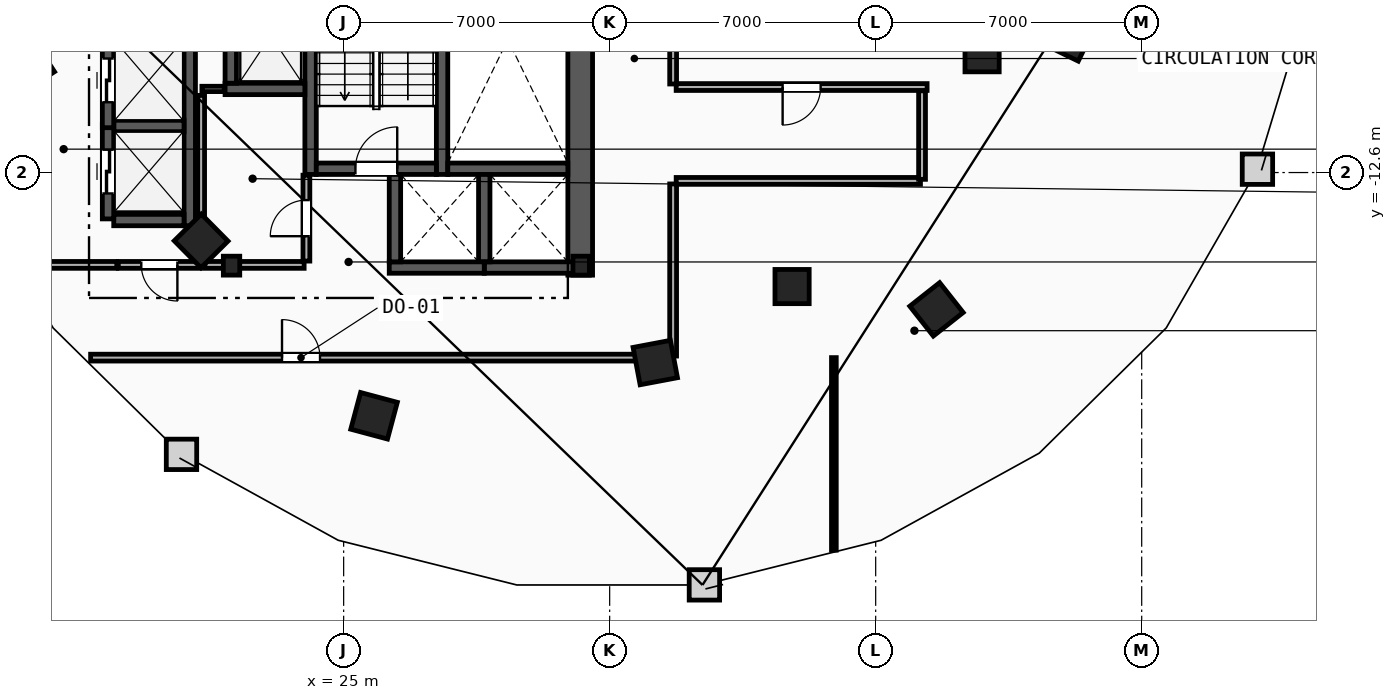
"""IFC4 building model, lengths in metres.
Left out: names, types, materials, properties, quantities, classifications, styles, units other than length and angle.
Written with IfcOpenShell. Run it as: python <this file> out.ifc"""

import sys

from ifc_helpers import new_model, si_unit, direction, frame, frame_2d, origin, origin_2d, place, context, subcontext, project, spatial, rectangle, i_section, extrude, element, fill, save


model = new_model("IFC4")
c1 = context("Model", 3, precision=1e-05, world=origin(), true_north=direction((0.0, 1.0)))
c2 = subcontext(c1, "Body", "Model", "MODEL_VIEW")
j1 = project(units=[si_unit("LENGTHUNIT", "METRE"), si_unit("PLANEANGLEUNIT", "RADIAN")], contexts=[c1])
p1 = place(None, origin())
s1 = spatial("IfcSite", under=j1, at=p1, CompositionType="ELEMENT")
p2 = place(p1, origin())
s2 = spatial("IfcBuilding", under=s1, at=p2, CompositionType="ELEMENT")
p3 = place(p2, frame((0.0, 0.0, 144.0)))
s3 = spatial("IfcBuildingStorey", under=s2, at=p3, CompositionType="ELEMENT", Elevation=144.0)
for number, where, z_axis, x_axis in (
    (1, (22.05, -15.05, 0.0), (0.0, 0.0, 1.0), (1.0, 0.0, 0.0)),
    (2, (31.25, -15.05, 0.0), (0.0, 0.0, 1.0), (1.0, 0.0, 0.0)),
):
    element("IfcColumn", number, at=place(p3, frame(where, z_axis=z_axis, x_axis=x_axis)), inside=s3, PredefinedType="COLUMN", context=c2, shape_type="SweptSolid", body=[
        extrude(i_section(OverallWidth=0.432, OverallDepth=0.498, WebThickness=0.056, FlangeThickness=0.089, FilletRadius=0.018, at=origin_2d()), origin(), (0.0, 0.0, 1.0), 3.6),
    ])
for number, where, z_axis, x_axis in (
    (3, (41.8, -9.5, 0.0), (0.0, 0.0, 1.0), (1.0, 0.0, 0.0)),
    (4, (36.8, -15.6, 0.0), (0.0, 0.0, 1.0), (1.0, 0.0, 0.0)),
):
    element("IfcColumn", number, at=place(p3, frame(where, z_axis=z_axis, x_axis=x_axis)), inside=s3, PredefinedType="COLUMN", context=c2, shape_type="SweptSolid", body=[
        extrude(rectangle(XDim=0.9, YDim=0.9, at=origin_2d()), origin(), (0.0, 0.0, 1.0), 3.6),
    ])
for number, where, z_axis, x_axis in (
    (5, (16.7, -9.8, 0.0), (0.0, 0.0, 1.0), (0.544, -0.839, 0.0)),
    (6, (21.25, -14.4, 0.0), (0.0, 0.0, 1.0), (0.703, -0.711, 0.0)),
    (7, (25.8, -19.0, 0.0), (0.0, 0.0, 1.0), (0.966, -0.259, 0.0)),
    (8, (33.2, -17.6, 0.0), (0.0, 0.0, 1.0), (0.983, 0.186, 0.0)),
    (9, (40.6, -16.2, 0.0), (0.0, 0.0, 1.0), (0.785, 0.619, 0.0)),
    (10, (44.1, -9.0, 0.0), (0.0, 0.0, 1.0), (0.437, 0.899, 0.0)),
):
    element("IfcColumn", number, at=place(p3, frame(where, z_axis=z_axis, x_axis=x_axis)), inside=s3, PredefinedType="COLUMN", context=c2, shape_type="SweptSolid", body=[
        extrude(rectangle(XDim=1.0, YDim=1.0, at=origin_2d()), origin(), (0.0, 0.0, 1.0), 3.6),
    ])
p4 = place(p3, frame((31.225, -15.3, 0.0), z_axis=(0.0, 0.0, 1.0), x_axis=(0.0, 1.0, 0.0)))
e11 = element("IfcWall", 11, at=p4, inside=s3, PredefinedType="SHEAR", context=c2, shape_type="SweptSolid", body=[
    extrude(rectangle(XDim=13.33, YDim=0.65, at=frame_2d((6.665, 0.0))), origin(), (0.0, 0.0, 1.0), 3.36),
])
for number, where, z_axis, x_axis in (
    (12, (27.59, -12.65, 0.0), (0.0, 0.0, 1.0), (0.0, 1.0, 0.0)),
    (13, (24.13, -12.65, 0.0), (0.0, 0.0, 1.0), (0.0, 1.0, 0.0)),
):
    element("IfcWall", number, at=place(p3, frame(where, z_axis=z_axis, x_axis=x_axis)), inside=s3, PredefinedType="SHEAR", context=c2, shape_type="SweptSolid", body=[
        extrude(rectangle(XDim=10.68, YDim=0.3, at=frame_2d((5.34, 0.0))), origin(), (0.0, 0.0, 1.0), 3.36),
    ])
p5 = place(p3, frame((27.74, -12.5, 0.0), z_axis=(0.0, 0.0, 1.0), x_axis=(1.0, 0.0, 0.0)))
e14 = element("IfcWall", 14, at=p5, inside=s3, PredefinedType="SHEAR", context=c2, shape_type="SweptSolid", body=[
    extrude(rectangle(XDim=3.16, YDim=0.3, at=frame_2d((1.58, 0.0))), origin(), (0.0, 0.0, 1.0), 3.36),
])
p6 = place(p3, frame((24.28, -12.5, 0.0), z_axis=(0.0, 0.0, 1.0), x_axis=(1.0, 0.0, 0.0)))
e15 = element("IfcWall", 15, at=p6, inside=s3, PredefinedType="SHEAR", context=c2, shape_type="SweptSolid", body=[
    extrude(rectangle(XDim=3.16, YDim=0.3, at=frame_2d((1.58, 0.0))), origin(), (0.0, 0.0, 1.0), 3.36),
])
p7 = place(p6, frame((1.03, 0.0, 0.0)))
e16 = element("IfcOpeningElement", 16, at=p7, cuts=e15, PredefinedType="OPENING", context=c2, shape_type="SweptSolid", body=[
    extrude(rectangle(XDim=1.1, YDim=2.15, at=frame_2d((0.55, 1.075))), frame((0.0, 0.16, 0.0), z_axis=(0.0, -1.0, 0.0), x_axis=(1.0, 0.0, 0.0)), (0.0, 0.0, 1.0), 0.32),
])
p8 = place(p3, frame((21.88, -10.4, 0.0), z_axis=(0.0, 0.0, 1.0), x_axis=(1.0, 0.0, 0.0)))
e17 = element("IfcWall", 17, at=p8, inside=s3, PredefinedType="SHEAR", context=c2, shape_type="SweptSolid", body=[
    extrude(rectangle(XDim=2.1, YDim=0.3, at=frame_2d((1.05, 0.0))), origin(), (0.0, 0.0, 1.0), 3.36),
])
for number, where, z_axis, x_axis in (
    (18, (22.03, -10.25, 0.0), (0.0, 0.0, 1.0), (0.0, 1.0, 0.0)),
    (19, (28.7, -15.1, 0.0), (0.0, 0.0, 1.0), (1.0, 0.0, 0.0)),
):
    element("IfcWall", number, at=place(p3, frame(where, z_axis=z_axis, x_axis=x_axis)), inside=s3, PredefinedType="SHEAR", context=c2, shape_type="SweptSolid", body=[
        extrude(rectangle(XDim=2.5, YDim=0.3, at=frame_2d((1.25, 0.0))), origin(), (0.0, 0.0, 1.0), 3.36),
    ])
p9 = place(p3, frame((28.7, -14.95, 0.0), z_axis=(0.0, 0.0, 1.0), x_axis=(0.0, 1.0, 0.0)))
e20 = element("IfcWall", 20, at=p9, inside=s3, PredefinedType="SHEAR", context=c2, shape_type="SweptSolid", body=[
    extrude(rectangle(XDim=2.3, YDim=0.3, at=frame_2d((1.15, 0.0))), origin(), (0.0, 0.0, 1.0), 3.36),
])
p10 = place(p3, frame((26.2, -15.1, 0.0), z_axis=(0.0, 0.0, 1.0), x_axis=(1.0, 0.0, 0.0)))
e21 = element("IfcWall", 21, at=p10, inside=s3, PredefinedType="SHEAR", context=c2, shape_type="SweptSolid", body=[
    extrude(rectangle(XDim=2.5, YDim=0.3, at=frame_2d((1.25, 0.0))), origin(), (0.0, 0.0, 1.0), 3.36),
])
p11 = place(p3, frame((26.35, -14.95, 0.0), z_axis=(0.0, 0.0, 1.0), x_axis=(0.0, 1.0, 0.0)))
e22 = element("IfcWall", 22, at=p11, inside=s3, PredefinedType="SHEAR", context=c2, shape_type="SweptSolid", body=[
    extrude(rectangle(XDim=2.3, YDim=0.3, at=frame_2d((1.15, 0.0))), origin(), (0.0, 0.0, 1.0), 3.36),
])
p12 = place(p3, frame((20.95, -14.0, 0.0), z_axis=(0.0, 0.0, 1.0), x_axis=(0.0, 1.0, 0.0)))
e23 = element("IfcWall", 23, at=p12, inside=s3, PredefinedType="SHEAR", context=c2, shape_type="SweptSolid", body=[
    extrude(rectangle(XDim=5.25, YDim=0.3, at=frame_2d((2.625, 0.0))), origin(), (0.0, 0.0, 1.0), 3.36),
])
for number, where, z_axis, x_axis in (
    (24, (18.95, -13.85, 0.0), (0.0, 0.0, 1.0), (1.0, 0.0, 0.0)),
    (25, (18.95, -11.375, 0.0), (0.0, 0.0, 1.0), (1.0, 0.0, 0.0)),
):
    element("IfcWall", number, at=place(p3, frame(where, z_axis=z_axis, x_axis=x_axis)), inside=s3, PredefinedType="SHEAR", context=c2, shape_type="SweptSolid", body=[
        extrude(rectangle(XDim=1.85, YDim=0.3, at=frame_2d((0.925, 0.0))), origin(), (0.0, 0.0, 1.0), 3.36),
    ])
p13 = place(p3, frame((18.8, -13.82, 0.0), z_axis=(0.0, 0.0, 1.0), x_axis=(0.0, 1.0, 0.0)))
e26 = element("IfcWall", 26, at=p13, inside=s3, PredefinedType="SHEAR", context=c2, shape_type="SweptSolid", body=[
    extrude(rectangle(XDim=2.49, YDim=0.3, at=frame_2d((1.245, 0.0))), origin(), (0.0, 0.0, 1.0), 3.36),
])
p14 = place(p13, frame((0.67, 0.0, 0.0)))
e27 = element("IfcOpeningElement", 27, at=p14, cuts=e26, PredefinedType="OPENING", context=c2, shape_type="SweptSolid", body=[
    extrude(rectangle(XDim=1.15, YDim=2.2, at=frame_2d((0.575, 1.1))), frame((0.0, 0.16, 0.0), z_axis=(0.0, -1.0, 0.0), x_axis=(1.0, 0.0, 0.0)), (0.0, 0.0, 1.0), 0.32),
])
p15 = place(p3, frame((18.8, -11.42, 0.0), z_axis=(0.0, 0.0, 1.0), x_axis=(0.0, 1.0, 0.0)))
e28 = element("IfcWall", 28, at=p15, inside=s3, PredefinedType="SHEAR", context=c2, shape_type="SweptSolid", body=[
    extrude(rectangle(XDim=2.49, YDim=0.3, at=frame_2d((1.245, 0.0))), origin(), (0.0, 0.0, 1.0), 3.36),
])
p16 = place(p15, frame((0.67, 0.0, 0.0)))
e29 = element("IfcOpeningElement", 29, at=p16, cuts=e28, PredefinedType="OPENING", context=c2, shape_type="SweptSolid", body=[
    extrude(rectangle(XDim=1.15, YDim=2.2, at=frame_2d((0.575, 1.1))), frame((0.0, 0.16, 0.0), z_axis=(0.0, -1.0, 0.0), x_axis=(1.0, 0.0, 0.0)), (0.0, 0.0, 1.0), 0.32),
])
p17 = place(p3, frame((17.04, -15.03, 0.0), z_axis=(0.0, 0.0, 1.0), x_axis=(1.0, 0.0, 0.0)))
e30 = element("IfcWall", 30, at=p17, inside=s3, PredefinedType="PARTITIONING", context=c2, shape_type="SweptSolid", body=[
    extrude(rectangle(XDim=1.99, YDim=0.18, at=frame_2d((0.995, 0.0))), origin(), (0.0, 0.0, 1.0), 3.36),
])
p18 = place(p3, frame((21.23, -15.03, 0.0), z_axis=(0.0, 0.0, 1.0), x_axis=(-1.0, 0.0, 0.0)))
e31 = element("IfcWall", 31, at=p18, inside=s3, PredefinedType="PARTITIONING", context=c2, shape_type="SweptSolid", body=[
    extrude(rectangle(XDim=2.16, YDim=0.18, at=frame_2d((1.08, 0.0))), origin(), (0.0, 0.0, 1.0), 3.36),
])
p19 = place(p18, frame((0.605, 0.0, 0.0)))
e32 = element("IfcOpeningElement", 32, at=p19, cuts=e31, PredefinedType="OPENING", context=c2, shape_type="SweptSolid", body=[
    extrude(rectangle(XDim=0.95, YDim=2.1, at=frame_2d((0.475, 1.05))), frame((0.0, 0.1, 0.0), z_axis=(0.0, -1.0, 0.0), x_axis=(1.0, 0.0, 0.0)), (0.0, 0.0, 1.0), 0.2),
])
p20 = place(p3, frame((21.27, -10.4, 0.0), z_axis=(0.0, 0.0, 1.0), x_axis=(1.0, 0.0, 0.0)))
e33 = element("IfcWall", 33, at=p20, inside=s3, PredefinedType="PARTITIONING", context=c2, shape_type="SweptSolid", body=[
    extrude(rectangle(XDim=0.59, YDim=0.14, at=frame_2d((0.295, 0.0))), origin(), (0.0, 0.0, 1.0), 3.36),
])
p21 = place(p3, frame((21.25, -14.93, 0.0), z_axis=(0.0, 0.0, 1.0), x_axis=(0.0, 1.0, 0.0)))
e34 = element("IfcWall", 34, at=p21, inside=s3, PredefinedType="PARTITIONING", context=c2, shape_type="SweptSolid", body=[
    extrude(rectangle(XDim=4.36, YDim=0.18, at=frame_2d((2.18, 0.0))), origin(), (0.0, 0.0, 1.0), 3.36),
])
p22 = place(p3, frame((21.35, -15.03, 0.0), z_axis=(0.0, 0.0, 1.0), x_axis=(1.0, 0.0, 0.0)))
e35 = element("IfcWall", 35, at=p22, inside=s3, PredefinedType="PARTITIONING", context=c2, shape_type="SweptSolid", body=[
    extrude(rectangle(XDim=2.61, YDim=0.18, at=frame_2d((1.305, 0.0))), origin(), (0.0, 0.0, 1.0), 2.433),
])
p23 = place(p3, frame((24.02, -14.93, 0.0), z_axis=(0.0, 0.0, 1.0), x_axis=(0.0, 1.0, 0.0)))
e36 = element("IfcWall", 36, at=p23, inside=s3, PredefinedType="PARTITIONING", context=c2, shape_type="SweptSolid", body=[
    extrude(rectangle(XDim=2.26, YDim=0.18, at=frame_2d((1.13, 0.0))), origin(), (0.0, 0.0, 1.0), 3.36),
])
p24 = place(p23, frame((0.655, 0.0, 0.0)))
e37 = element("IfcOpeningElement", 37, at=p24, cuts=e36, PredefinedType="OPENING", context=c2, shape_type="SweptSolid", body=[
    extrude(rectangle(XDim=0.95, YDim=2.1, at=frame_2d((0.475, 1.05))), frame((0.0, 0.1, 0.0), z_axis=(0.0, -1.0, 0.0), x_axis=(1.0, 0.0, 0.0)), (0.0, 0.0, 1.0), 0.2),
])
p25 = place(p3, frame((37.9, -22.536, 0.0), z_axis=(0.0, 0.0, 1.0), x_axis=(0.0, 1.0, 0.0)))
e38 = element("IfcWall", 38, at=p25, inside=s3, PredefinedType="PARTITIONING", context=c2, shape_type="SweptSolid", body=[
    extrude(rectangle(XDim=5.066, YDim=0.125, at=frame_2d((2.533, 0.0))), origin(), (0.0, 0.0, 1.0), 3.36),
])
p26 = place(p3, frame((18.342, -17.47, 0.0), z_axis=(0.0, 0.0, 1.0), x_axis=(1.0, 0.0, 0.0)))
e39 = element("IfcWall", 39, at=p26, inside=s3, PredefinedType="PARTITIONING", context=c2, shape_type="SweptSolid", body=[
    extrude(rectangle(XDim=15.287, YDim=0.18, at=frame_2d((7.643, 0.0))), origin(), (0.0, 0.0, 1.0), 3.36),
])
p27 = place(p26, frame((5.036, 0.0, 0.0)))
e40 = element("IfcOpeningElement", 40, at=p27, cuts=e39, PredefinedType="OPENING", context=c2, shape_type="SweptSolid", body=[
    extrude(rectangle(XDim=1.0, YDim=2.15, at=frame_2d((0.5, 1.075))), frame((0.0, 0.1, 0.0), z_axis=(0.0, -1.0, 0.0), x_axis=(1.0, 0.0, 0.0)), (0.0, 0.0, 1.0), 0.2),
])
p28 = place(p3, frame((33.75, -12.82, 0.0), z_axis=(0.0, 0.0, 1.0), x_axis=(1.0, 0.0, 0.0)))
e41 = element("IfcWall", 41, at=p28, inside=s3, PredefinedType="PARTITIONING", context=c2, shape_type="SweptSolid", body=[
    extrude(rectangle(XDim=6.428, YDim=0.18, at=frame_2d((3.214, 0.0))), origin(), (0.0, 0.0, 1.0), 3.36),
])
p29 = place(p3, frame((33.67, -17.428, 0.0), z_axis=(0.0, 0.0, 1.0), x_axis=(0.0, 1.0, 0.0)))
e42 = element("IfcWall", 42, at=p29, inside=s3, PredefinedType="PARTITIONING", context=c2, shape_type="SweptSolid", body=[
    extrude(rectangle(XDim=4.529, YDim=0.18, at=frame_2d((2.264, 0.0))), origin(), (0.0, 0.0, 1.0), 3.36),
])
p30 = place(p3, frame((40.22, -12.779, 0.0), z_axis=(0.0, 0.0, 1.0), x_axis=(0.0, 1.0, 0.0)))
e43 = element("IfcWall", 43, at=p30, inside=s3, PredefinedType="PARTITIONING", context=c2, shape_type="SweptSolid", body=[
    extrude(rectangle(XDim=2.329, YDim=0.18, at=frame_2d((1.164, 0.0))), origin(), (0.0, 0.0, 1.0), 3.36),
])
p31 = place(p3, frame((40.353, -10.35, 0.0), z_axis=(0.0, 0.0, 1.0), x_axis=(-1.0, 0.0, 0.0)))
e44 = element("IfcWall", 44, at=p31, inside=s3, PredefinedType="PARTITIONING", context=c2, shape_type="SweptSolid", body=[
    extrude(rectangle(XDim=6.603, YDim=0.18, at=frame_2d((3.301, 0.0))), origin(), (0.0, 0.0, 1.0), 3.36),
])
p32 = place(p31, frame((2.802, 0.0, 0.0)))
e45 = element("IfcOpeningElement", 45, at=p32, cuts=e44, PredefinedType="OPENING", context=c2, shape_type="SweptSolid", body=[
    extrude(rectangle(XDim=1.0, YDim=2.15, at=frame_2d((0.5, 1.075))), frame((0.0, 0.1, 0.0), z_axis=(0.0, -1.0, 0.0), x_axis=(1.0, 0.0, 0.0)), (0.0, 0.0, 1.0), 0.2),
])
p33 = place(p3, frame((33.67, -10.27, 0.0), z_axis=(0.0, 0.0, 1.0), x_axis=(0.0, 1.0, 0.0)))
e46 = element("IfcWall", 46, at=p33, inside=s3, PredefinedType="PARTITIONING", context=c2, shape_type="SweptSolid", body=[
    extrude(rectangle(XDim=1.269, YDim=0.18, at=frame_2d((0.634, 0.0))), origin(), (0.0, 0.0, 1.0), 3.36),
])
p34 = place(p7, origin())
e47 = element("IfcDoor", 47, at=p34, inside=s3, OperationType="SINGLE_SWING_RIGHT", PredefinedType="DOOR", context=c2, shape_type="SweptSolid", body=[
    extrude(rectangle(XDim=1.1, YDim=2.15, at=frame_2d((0.55, 1.075))), frame((0.0, 0.025, 0.0), z_axis=(0.0, -1.0, 0.0), x_axis=(1.0, 0.0, 0.0)), (0.0, 0.0, 1.0), 0.05),
])
fill(e16, e47)
p35 = place(p14, origin())
e48 = element("IfcDoor", 48, at=p35, inside=s3, OperationType="SLIDING_TO_LEFT", PredefinedType="TRAPDOOR", context=c2, shape_type="SweptSolid", body=[
    extrude(rectangle(XDim=1.15, YDim=2.2, at=frame_2d((0.575, 1.1))), frame((0.0, 0.025, 0.0), z_axis=(0.0, -1.0, 0.0), x_axis=(1.0, 0.0, 0.0)), (0.0, 0.0, 1.0), 0.05),
])
fill(e27, e48)
p36 = place(p16, origin())
e49 = element("IfcDoor", 49, at=p36, inside=s3, OperationType="SLIDING_TO_LEFT", PredefinedType="TRAPDOOR", context=c2, shape_type="SweptSolid", body=[
    extrude(rectangle(XDim=1.15, YDim=2.2, at=frame_2d((0.575, 1.1))), frame((0.0, 0.025, 0.0), z_axis=(0.0, -1.0, 0.0), x_axis=(1.0, 0.0, 0.0)), (0.0, 0.0, 1.0), 0.05),
])
fill(e29, e49)
p37 = place(p27, origin())
e50 = element("IfcDoor", 50, at=p37, inside=s3, OperationType="SINGLE_SWING_LEFT", PredefinedType="DOOR", context=c2, shape_type="SweptSolid", body=[
    extrude(rectangle(XDim=1.0, YDim=2.15, at=frame_2d((0.5, 1.075))), frame((0.0, 0.025, 0.0), z_axis=(0.0, -1.0, 0.0), x_axis=(1.0, 0.0, 0.0)), (0.0, 0.0, 1.0), 0.05),
])
fill(e40, e50)
p38 = place(p32, origin())
e51 = element("IfcDoor", 51, at=p38, inside=s3, OperationType="SINGLE_SWING_RIGHT", PredefinedType="DOOR", context=c2, shape_type="SweptSolid", body=[
    extrude(rectangle(XDim=1.0, YDim=2.15, at=frame_2d((0.5, 1.075))), frame((0.0, 0.025, 0.0), z_axis=(0.0, -1.0, 0.0), x_axis=(1.0, 0.0, 0.0)), (0.0, 0.0, 1.0), 0.05),
])
fill(e45, e51)
p39 = place(p24, origin())
e52 = element("IfcDoor", 52, at=p39, inside=s3, OperationType="SINGLE_SWING_LEFT", PredefinedType="DOOR", context=c2, shape_type="SweptSolid", body=[
    extrude(rectangle(XDim=0.95, YDim=2.1, at=frame_2d((0.475, 1.05))), frame((0.0, 0.025, 0.0), z_axis=(0.0, -1.0, 0.0), x_axis=(1.0, 0.0, 0.0)), (0.0, 0.0, 1.0), 0.05),
])
fill(e37, e52)
p40 = place(p19, origin())
e53 = element("IfcDoor", 53, at=p40, inside=s3, OperationType="SINGLE_SWING_LEFT", PredefinedType="DOOR", context=c2, shape_type="SweptSolid", body=[
    extrude(rectangle(XDim=0.95, YDim=2.1, at=frame_2d((0.475, 1.05))), frame((0.0, 0.025, 0.0), z_axis=(0.0, -1.0, 0.0), x_axis=(1.0, 0.0, 0.0)), (0.0, 0.0, 1.0), 0.05),
])
fill(e32, e53)
save(model, sys.argv[1])
